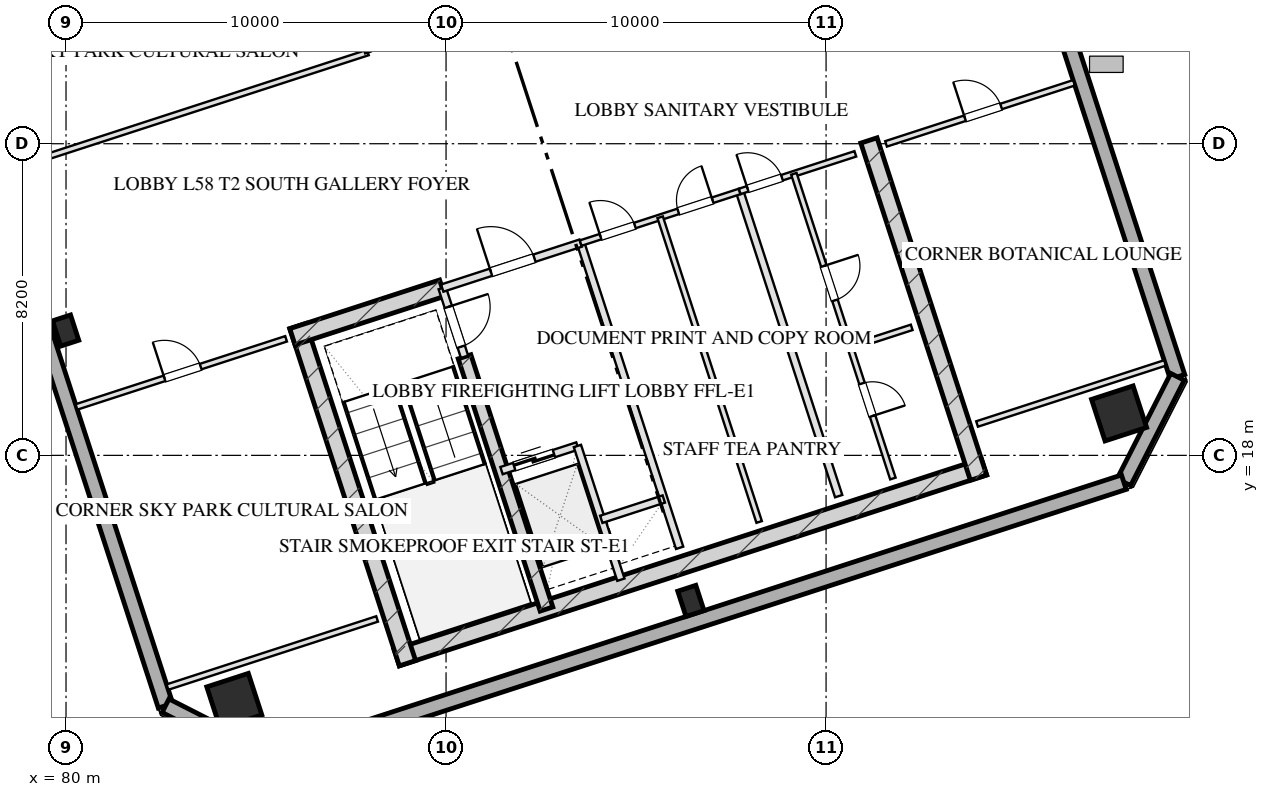
"""IFC4 building model, lengths in metres.
Left out: names, types, materials, properties, quantities, classifications, styles, units other than length and angle.
Written with IfcOpenShell. Run it as: python <this file> out.ifc"""

import sys

from ifc_helpers import new_model, si_unit, direction, frame, frame_2d, origin, origin_2d, place, context, subcontext, project, spatial, rectangle, hollow_rectangle, extrude, element, fill, save


model = new_model("IFC4")
c1 = context("Model", 3, precision=1e-05, world=origin(), true_north=direction((0.0, 1.0)))
c2 = subcontext(c1, "Body", "Model", "MODEL_VIEW")
j1 = project(units=[si_unit("LENGTHUNIT", "METRE"), si_unit("PLANEANGLEUNIT", "RADIAN")], contexts=[c1])
p1 = place(None, origin())
s1 = spatial("IfcSite", under=j1, at=p1, CompositionType="ELEMENT")
p2 = place(p1, origin())
s2 = spatial("IfcBuilding", under=s1, at=p2, CompositionType="ELEMENT")
p3 = place(p2, frame((0.0, 0.0, 216.2)))
s3 = spatial("IfcBuildingStorey", under=s2, at=p3, CompositionType="ELEMENT", Elevation=216.2)
p4 = place(p3, frame((88.701, 12.675, 0.0), z_axis=(0.0, 0.0, 1.0), x_axis=(0.95105824505, 0.309011673763, 0.0)))
e1 = element("IfcWall", 1, at=p4, inside=s3, PredefinedType="SHEAR", context=c2, shape_type="SweptSolid", body=[
    extrude(rectangle(XDim=16.25, YDim=0.45, at=frame_2d((8.125, 0.0))), origin(), (0.0, 0.0, 1.0), 3.45),
])
for number, where, z_axis, x_axis in (
    (2, (86.102, 21.404, 0.0), (0.0, 0.0, 1.0), (0.309, -0.951, 0.0)),
    (3, (101.128, 26.286, 0.0), (0.0, 0.0, 1.0), (0.309, -0.951, 0.0)),
):
    element("IfcWall", number, at=place(p3, frame(where, z_axis=z_axis, x_axis=x_axis)), inside=s3, PredefinedType="SHEAR", context=c2, shape_type="SweptSolid", body=[
        extrude(rectangle(XDim=9.33, YDim=0.45, at=frame_2d((4.665, 0.0))), origin(), (0.0, 0.0, 1.0), 3.45),
    ])
p5 = place(p3, frame((90.486, 20.594, 0.0), z_axis=(0.0, 0.0, 1.0), x_axis=(0.309020428229, -0.951055400562, 0.0)))
e4 = element("IfcWall", 4, at=p5, inside=s3, PredefinedType="SHEAR", context=c2, shape_type="SweptSolid", body=[
    extrude(rectangle(XDim=6.98, YDim=0.35, at=frame_2d((3.49, 0.0))), origin(), (0.0, 0.0, 1.0), 3.45),
])
p6 = place(p3, frame((85.957, 21.12, 0.0), z_axis=(0.0, 0.0, 1.0), x_axis=(0.951064796122, 0.308991510526, 0.0)))
e5 = element("IfcWall", 5, at=p6, inside=s3, PredefinedType="SHEAR", context=c2, shape_type="SweptSolid", body=[
    extrude(rectangle(XDim=4.145, YDim=0.45, at=frame_2d((2.073, 0.0))), origin(), (0.0, 0.0, 1.0), 3.45),
])
for number, where, z_axis, x_axis in (
    (6, (84.428, 11.539, 0.0), (0.0, 0.0, 1.0), (0.951, 0.309, 0.0)),
    (7, (107.71, 19.104, 0.0), (0.0, 0.0, 1.0), (0.951, 0.309, 0.0)),
):
    element("IfcColumn", number, at=place(p3, frame(where, z_axis=z_axis, x_axis=x_axis)), inside=s3, PredefinedType="COLUMN", context=c2, shape_type="SweptSolid", body=[
        extrude(hollow_rectangle(XDim=1.15, YDim=1.15, WallThickness=0.04, at=origin_2d()), origin(), (0.0, 0.0, 1.0), 3.451),
    ])
for number, where, z_axis, x_axis in (
    (8, (79.99, 21.284, 0.0), (0.0, 0.0, 1.0), (0.951, 0.309, 0.0)),
    (9, (96.443, 14.17, 0.0), (0.0, 0.0, 1.0), (0.951, 0.309, 0.0)),
):
    element("IfcColumn", number, at=place(p3, frame(where, z_axis=z_axis, x_axis=x_axis)), inside=s3, PredefinedType="COLUMN", context=c2, shape_type="SweptSolid", body=[
        extrude(hollow_rectangle(XDim=0.5, YDim=0.7, WallThickness=0.025, at=origin_2d()), origin(), (0.0, 0.0, 1.0), 3.451),
    ])
p7 = place(p3, frame((82.618, 11.414, 0.0), z_axis=(0.0, 0.0, 1.0), x_axis=(-0.309016491071, 0.951056679828, 0.0)))
e10 = element("IfcWall", 10, at=p7, inside=s3, PredefinedType="SOLIDWALL", context=c2, shape_type="SweptSolid", body=[
    extrude(rectangle(XDim=38.4, YDim=0.4, at=frame_2d((19.2, 0.0))), origin(), (0.0, 0.0, 1.0), 2.55),
])
p8 = place(p7, frame((24.15, 0.0, 0.0)))
e11 = element("IfcOpeningElement", 11, at=p8, cuts=e10, PredefinedType="OPENING", context=c2, shape_type="SweptSolid", body=[
    extrude(rectangle(XDim=1.8, YDim=2.2, at=frame_2d((0.9, 1.1))), frame((0.0, 0.21, 0.0), z_axis=(0.0, -1.0, 0.0), x_axis=(1.0, 0.0, 0.0)), (0.0, 0.0, 1.0), 0.42),
])
p9 = place(p3, frame((97.382, 56.586, 0.0), z_axis=(0.0, 0.0, 1.0), x_axis=(0.309016491071, -0.951056679828, 0.0)))
e12 = element("IfcWall", 12, at=p9, inside=s3, PredefinedType="SOLIDWALL", context=c2, shape_type="SweptSolid", body=[
    extrude(rectangle(XDim=38.4, YDim=0.4, at=frame_2d((19.2, 0.0))), origin(), (0.0, 0.0, 1.0), 2.55),
])
p10 = place(p9, frame((24.55, 0.0, 0.75)))
e13 = element("IfcOpeningElement", 13, at=p10, cuts=e12, PredefinedType="OPENING", context=c2, shape_type="SweptSolid", body=[
    extrude(rectangle(XDim=2.1, YDim=1.4, at=frame_2d((1.05, 0.7))), frame((0.0, 0.21, 0.0), z_axis=(0.0, -1.0, 0.0), x_axis=(1.0, 0.0, 0.0)), (0.0, 0.0, 1.0), 0.42),
])
p11 = place(p9, frame((20.75, 0.0, 0.75)))
e14 = element("IfcOpeningElement", 14, at=p11, cuts=e12, PredefinedType="OPENING", context=c2, shape_type="SweptSolid", body=[
    extrude(rectangle(XDim=2.1, YDim=1.4, at=frame_2d((1.05, 0.7))), frame((0.0, 0.21, 0.0), z_axis=(0.0, -1.0, 0.0), x_axis=(1.0, 0.0, 0.0)), (0.0, 0.0, 1.0), 0.42),
])
p12 = place(p9, frame((15.55, 0.0, 0.75)))
e15 = element("IfcOpeningElement", 15, at=p12, cuts=e12, PredefinedType="OPENING", context=c2, shape_type="SweptSolid", body=[
    extrude(rectangle(XDim=2.1, YDim=1.4, at=frame_2d((1.05, 0.7))), frame((0.0, 0.21, 0.0), z_axis=(0.0, -1.0, 0.0), x_axis=(1.0, 0.0, 0.0)), (0.0, 0.0, 1.0), 0.42),
])
p13 = place(p9, frame((11.75, 0.0, 0.75)))
e16 = element("IfcOpeningElement", 16, at=p13, cuts=e12, PredefinedType="OPENING", context=c2, shape_type="SweptSolid", body=[
    extrude(rectangle(XDim=2.1, YDim=1.4, at=frame_2d((1.05, 0.7))), frame((0.0, 0.21, 0.0), z_axis=(0.0, -1.0, 0.0), x_axis=(1.0, 0.0, 0.0)), (0.0, 0.0, 1.0), 0.42),
])
p14 = place(p3, frame((109.248, 20.066, 0.0), z_axis=(0.0, 0.0, 1.0), x_axis=(-0.453949291228, -0.891027519774, 0.0)))
e17 = element("IfcWall", 17, at=p14, inside=s3, PredefinedType="SOLIDWALL", context=c2, shape_type="SweptSolid", body=[
    extrude(rectangle(XDim=3.111, YDim=0.4, at=frame_2d((1.556, 0.0))), origin(), (0.0, 0.0, 1.0), 2.55),
])
p15 = place(p3, frame((107.835, 17.294, 0.0), z_axis=(0.0, 0.0, 1.0), x_axis=(-0.951058012937, -0.309012388148, 0.0)))
e18 = element("IfcWall", 18, at=p15, inside=s3, PredefinedType="SOLIDWALL", context=c2, shape_type="SweptSolid", body=[
    extrude(rectangle(XDim=23.6, YDim=0.4, at=frame_2d((11.8, 0.0))), origin(), (0.0, 0.0, 1.0), 2.55),
])
p16 = place(p3, frame((85.39, 10.001, 0.0), z_axis=(0.0, 0.0, 1.0), x_axis=(-0.890979603174, 0.454043331334, 0.0)))
e19 = element("IfcWall", 19, at=p16, inside=s3, PredefinedType="SOLIDWALL", context=c2, shape_type="SweptSolid", body=[
    extrude(rectangle(XDim=3.111, YDim=0.4, at=frame_2d((1.556, 0.0))), origin(), (0.0, 0.0, 1.0), 2.55),
])
p17 = place(p3, frame((89.899, 22.401, 0.0), z_axis=(0.0, 0.0, 1.0), x_axis=(0.308932062672, -0.951084108086, 0.0)))
e20 = element("IfcWall", 20, at=p17, inside=s3, PredefinedType="PARTITIONING", context=c2, shape_type="SweptSolid", body=[
    extrude(rectangle(XDim=1.9, YDim=0.2, at=frame_2d((0.95, 0.0))), origin(), (0.0, 0.0, 1.0), 3.155),
])
p18 = place(p17, frame((0.52, 0.0, 0.0)))
e21 = element("IfcOpeningElement", 21, at=p18, cuts=e20, PredefinedType="OPENING", context=c2, shape_type="SweptSolid", body=[
    extrude(rectangle(XDim=1.1, YDim=2.05, at=frame_2d((0.55, 1.025))), frame((0.0, 0.11, 0.0), z_axis=(0.0, -1.0, 0.0), x_axis=(1.0, 0.0, 0.0)), (0.0, 0.0, 1.0), 0.22),
])
p19 = place(p3, frame((93.542, 23.585, 0.0), z_axis=(0.0, 0.0, 1.0), x_axis=(0.309042196757, -0.951048327176, 0.0)))
e22 = element("IfcWall", 22, at=p19, inside=s3, PredefinedType="PARTITIONING", context=c2, shape_type="SweptSolid", body=[
    extrude(rectangle(XDim=8.43, YDim=0.2, at=frame_2d((4.215, 0.0))), origin(), (0.0, 0.0, 1.0), 3.155),
])
p20 = place(p3, frame((89.899, 22.401, 0.0), z_axis=(0.0, 0.0, 1.0), x_axis=(0.951046716504, 0.309047153403, 0.0)))
e23 = element("IfcWall", 23, at=p20, inside=s3, PredefinedType="PARTITIONING", context=c2, shape_type="SweptSolid", body=[
    extrude(rectangle(XDim=3.83, YDim=0.2, at=frame_2d((1.915, 0.0))), origin(), (0.0, 0.0, 1.0), 3.155),
])
p21 = place(p20, frame((1.35, 0.0, 0.0)))
e24 = element("IfcOpeningElement", 24, at=p21, cuts=e23, PredefinedType="OPENING", context=c2, shape_type="SweptSolid", body=[
    extrude(rectangle(XDim=1.2, YDim=2.05, at=frame_2d((0.6, 1.025))), frame((0.0, 0.11, 0.0), z_axis=(0.0, -1.0, 0.0), x_axis=(1.0, 0.0, 0.0)), (0.0, 0.0, 1.0), 0.22),
])
p22 = place(p3, frame((91.46, 17.598, 0.0), z_axis=(0.0, 0.0, 1.0), x_axis=(0.951062257173, 0.308999325213, 0.0)))
e25 = element("IfcWall", 25, at=p22, inside=s3, PredefinedType="PARTITIONING", context=c2, shape_type="SweptSolid", body=[
    extrude(rectangle(XDim=2.1, YDim=0.2, at=frame_2d((1.05, 0.0))), origin(), (0.0, 0.0, 1.0), 3.155),
])
p23 = place(p22, frame((0.35, 0.0, 0.0)))
e26 = element("IfcOpeningElement", 26, at=p23, cuts=e25, PredefinedType="OPENING", context=c2, shape_type="SweptSolid", body=[
    extrude(rectangle(XDim=1.1, YDim=2.05, at=frame_2d((0.55, 1.025))), frame((0.0, 0.11, 0.0), z_axis=(0.0, -1.0, 0.0), x_axis=(1.0, 0.0, 0.0)), (0.0, 0.0, 1.0), 0.22),
])
p24 = place(p3, frame((93.457, 18.247, 0.0), z_axis=(0.0, 0.0, 1.0), x_axis=(0.3089935693, -0.951064127245, 0.0)))
e27 = element("IfcWall", 27, at=p24, inside=s3, PredefinedType="PARTITIONING", context=c2, shape_type="SweptSolid", body=[
    extrude(rectangle(XDim=3.7, YDim=0.2, at=frame_2d((1.85, 0.0))), origin(), (0.0, 0.0, 1.0), 3.155),
])
p25 = place(p3, frame((94.084, 16.317, 0.0), z_axis=(0.0, 0.0, 1.0), x_axis=(0.951041328149, 0.309063734775, 0.0)))
e28 = element("IfcWall", 28, at=p25, inside=s3, PredefinedType="PARTITIONING", context=c2, shape_type="SweptSolid", body=[
    extrude(rectangle(XDim=1.73, YDim=0.2, at=frame_2d((0.865, 0.0))), origin(), (0.0, 0.0, 1.0), 3.155),
])
p26 = place(p3, frame((97.727, 24.944, 0.0), z_axis=(0.0, 0.0, 1.0), x_axis=(0.309016001439, -0.951056838919, 0.0)))
e29 = element("IfcWall", 29, at=p26, inside=s3, PredefinedType="PARTITIONING", context=c2, shape_type="SweptSolid", body=[
    extrude(rectangle(XDim=8.43, YDim=0.2, at=frame_2d((4.215, 0.0))), origin(), (0.0, 0.0, 1.0), 3.155),
])
p27 = place(p3, frame((93.542, 23.585, 0.0), z_axis=(0.0, 0.0, 1.0), x_axis=(0.951063829732, 0.308994485023, 0.0)))
e30 = element("IfcWall", 30, at=p27, inside=s3, PredefinedType="PARTITIONING", context=c2, shape_type="SweptSolid", body=[
    extrude(rectangle(XDim=4.4, YDim=0.15, at=frame_2d((2.2, 0.0))), origin(), (0.0, 0.0, 1.0), 3.155),
])
p28 = place(p27, frame((0.55, 0.0, 0.0)))
e31 = element("IfcOpeningElement", 31, at=p28, cuts=e30, PredefinedType="OPENING", context=c2, shape_type="SweptSolid", body=[
    extrude(rectangle(XDim=0.95, YDim=2.05, at=frame_2d((0.475, 1.025))), frame((0.0, 0.085, 0.0), z_axis=(0.0, -1.0, 0.0), x_axis=(1.0, 0.0, 0.0)), (0.0, 0.0, 1.0), 0.17),
])
p29 = place(p27, frame((2.7, 0.0, 0.0)))
e32 = element("IfcOpeningElement", 32, at=p29, cuts=e30, PredefinedType="OPENING", context=c2, shape_type="SweptSolid", body=[
    extrude(rectangle(XDim=0.95, YDim=2.05, at=frame_2d((0.475, 1.025))), frame((0.0, 0.085, 0.0), z_axis=(0.0, -1.0, 0.0), x_axis=(1.0, 0.0, 0.0)), (0.0, 0.0, 1.0), 0.17),
])
p30 = place(p3, frame((95.634, 24.265, 0.0), z_axis=(0.0, 0.0, 1.0), x_axis=(0.309007490203, -0.951059604335, 0.0)))
e33 = element("IfcWall", 33, at=p30, inside=s3, PredefinedType="PARTITIONING", context=c2, shape_type="SweptSolid", body=[
    extrude(rectangle(XDim=8.43, YDim=0.15, at=frame_2d((4.215, 0.0))), origin(), (0.0, 0.0, 1.0), 3.155),
])
p31 = place(p3, frame((97.727, 24.944, 0.0), z_axis=(0.0, 0.0, 1.0), x_axis=(0.951036872128, 0.309077446369, 0.0)))
e34 = element("IfcWall", 34, at=p31, inside=s3, PredefinedType="PARTITIONING", context=c2, shape_type="SweptSolid", body=[
    extrude(rectangle(XDim=3.2, YDim=0.15, at=frame_2d((1.6, 0.0))), origin(), (0.0, 0.0, 1.0), 3.155),
])
p32 = place(p31, frame((0.22, 0.0, 0.0)))
e35 = element("IfcOpeningElement", 35, at=p32, cuts=e34, PredefinedType="OPENING", context=c2, shape_type="SweptSolid", body=[
    extrude(rectangle(XDim=0.95, YDim=2.05, at=frame_2d((0.475, 1.025))), frame((0.0, 0.085, 0.0), z_axis=(0.0, -1.0, 0.0), x_axis=(1.0, 0.0, 0.0)), (0.0, 0.0, 1.0), 0.17),
])
p33 = place(p3, frame((99.153, 25.408, 0.0), z_axis=(0.0, 0.0, 1.0), x_axis=(0.309016001439, -0.951056838919, 0.0)))
e36 = element("IfcWall", 36, at=p33, inside=s3, PredefinedType="PARTITIONING", context=c2, shape_type="SweptSolid", body=[
    extrude(rectangle(XDim=8.43, YDim=0.15, at=frame_2d((4.215, 0.0))), origin(), (0.0, 0.0, 1.0), 3.155),
])
p34 = place(p33, frame((2.55, 0.0, 0.0)))
e37 = element("IfcOpeningElement", 37, at=p34, cuts=e36, PredefinedType="OPENING", context=c2, shape_type="SweptSolid", body=[
    extrude(rectangle(XDim=0.95, YDim=2.05, at=frame_2d((0.475, 1.025))), frame((0.0, 0.085, 0.0), z_axis=(0.0, -1.0, 0.0), x_axis=(1.0, 0.0, 0.0)), (0.0, 0.0, 1.0), 0.17),
])
p35 = place(p33, frame((5.8, 0.0, 0.0)))
e38 = element("IfcOpeningElement", 38, at=p35, cuts=e36, PredefinedType="OPENING", context=c2, shape_type="SweptSolid", body=[
    extrude(rectangle(XDim=0.9, YDim=2.05, at=frame_2d((0.45, 1.025))), frame((0.0, 0.085, 0.0), z_axis=(0.0, -1.0, 0.0), x_axis=(1.0, 0.0, 0.0)), (0.0, 0.0, 1.0), 0.17),
])
p36 = place(p3, frame((100.636, 20.843, 0.0), z_axis=(0.0, 0.0, 1.0), x_axis=(0.951040401051, 0.309066587596, 0.0)))
e39 = element("IfcWall", 39, at=p36, inside=s3, PredefinedType="PARTITIONING", context=c2, shape_type="SweptSolid", body=[
    extrude(rectangle(XDim=1.7, YDim=0.15, at=frame_2d((0.85, 0.0))), origin(), (0.0, 0.0, 1.0), 3.155),
])
p37 = place(p3, frame((82.669, 11.903, 0.0), z_axis=(0.0, 0.0, 1.0), x_axis=(0.951059431056, 0.309008023519, 0.0)))
e40 = element("IfcWall", 40, at=p37, inside=s3, PredefinedType="PARTITIONING", context=c2, shape_type="SweptSolid", body=[
    extrude(rectangle(XDim=5.8, YDim=0.15, at=frame_2d((2.9, 0.0))), origin(), (0.0, 0.0, 1.0), 3.155),
])
p38 = place(p3, frame((80.275, 19.274, 0.0), z_axis=(0.0, 0.0, 1.0), x_axis=(0.951059431056, 0.309008023519, 0.0)))
e41 = element("IfcWall", 41, at=p38, inside=s3, PredefinedType="PARTITIONING", context=c2, shape_type="SweptSolid", body=[
    extrude(rectangle(XDim=5.8, YDim=0.15, at=frame_2d((2.9, 0.0))), origin(), (0.0, 0.0, 1.0), 3.155),
])
p39 = place(p38, frame((2.436, 0.0, 0.0)))
e42 = element("IfcOpeningElement", 42, at=p39, cuts=e41, PredefinedType="OPENING", context=c2, shape_type="SweptSolid", body=[
    extrude(rectangle(XDim=1.0, YDim=2.05, at=frame_2d((0.5, 1.025))), frame((0.0, 0.085, 0.0), z_axis=(0.0, -1.0, 0.0), x_axis=(1.0, 0.0, 0.0)), (0.0, 0.0, 1.0), 0.17),
])
p40 = place(p3, frame((103.973, 18.825, 0.0), z_axis=(0.0, 0.0, 1.0), x_axis=(0.951055112834, 0.309021313752, 0.0)))
e43 = element("IfcWall", 43, at=p40, inside=s3, PredefinedType="PARTITIONING", context=c2, shape_type="SweptSolid", body=[
    extrude(rectangle(XDim=5.2, YDim=0.15, at=frame_2d((2.6, 0.0))), origin(), (0.0, 0.0, 1.0), 3.155),
])
p41 = place(p3, frame((101.578, 26.196, 0.0), z_axis=(0.0, 0.0, 1.0), x_axis=(0.951064427824, 0.308992644131, 0.0)))
e44 = element("IfcWall", 44, at=p41, inside=s3, PredefinedType="PARTITIONING", context=c2, shape_type="SweptSolid", body=[
    extrude(rectangle(XDim=5.2, YDim=0.15, at=frame_2d((2.6, 0.0))), origin(), (0.0, 0.0, 1.0), 3.155),
])
p42 = place(p41, frame((2.184, 0.0, 0.0)))
e45 = element("IfcOpeningElement", 45, at=p42, cuts=e44, PredefinedType="OPENING", context=c2, shape_type="SweptSolid", body=[
    extrude(rectangle(XDim=1.0, YDim=2.05, at=frame_2d((0.5, 1.025))), frame((0.0, 0.085, 0.0), z_axis=(0.0, -1.0, 0.0), x_axis=(1.0, 0.0, 0.0)), (0.0, 0.0, 1.0), 0.17),
])
p43 = place(p3, frame((78.266, 25.456, 0.0), z_axis=(0.0, 0.0, 1.0), x_axis=(0.951055402118, 0.30902042344, 0.0)))
e46 = element("IfcWall", 46, at=p43, inside=s3, PredefinedType="PARTITIONING", context=c2, shape_type="SweptSolid", body=[
    extrude(rectangle(XDim=10.175, YDim=0.15, at=frame_2d((5.087, 0.0))), origin(), (0.0, 0.0, 1.0), 3.155),
])
p44 = place(p3, frame((87.943, 28.6, 0.0), z_axis=(0.0, 0.0, 1.0), x_axis=(-0.309024734286, 0.951054001411, 0.0)))
e47 = element("IfcWall", 47, at=p44, inside=s3, PredefinedType="PARTITIONING", context=c2, shape_type="SweptSolid", body=[
    extrude(rectangle(XDim=9.0, YDim=0.15, at=frame_2d((4.5, 0.0))), origin(), (0.0, 0.0, 1.0), 3.155),
])
p45 = place(p44, frame((1.16, 0.0, 0.0)))
e48 = element("IfcOpeningElement", 48, at=p45, cuts=e47, PredefinedType="OPENING", context=c2, shape_type="SweptSolid", body=[
    extrude(rectangle(XDim=1.0, YDim=2.05, at=frame_2d((0.5, 1.025))), frame((0.0, 0.085, 0.0), z_axis=(0.0, -1.0, 0.0), x_axis=(1.0, 0.0, 0.0)), (0.0, 0.0, 1.0), 0.17),
])
p46 = place(p44, frame((5.66, 0.0, 0.0)))
e49 = element("IfcOpeningElement", 49, at=p46, cuts=e47, PredefinedType="OPENING", context=c2, shape_type="SweptSolid", body=[
    extrude(rectangle(XDim=1.0, YDim=2.05, at=frame_2d((0.5, 1.025))), frame((0.0, 0.085, 0.0), z_axis=(0.0, -1.0, 0.0), x_axis=(1.0, 0.0, 0.0)), (0.0, 0.0, 1.0), 0.17),
])
p47 = place(p3, frame((77.24, 28.613, 0.0), z_axis=(0.0, 0.0, 1.0), x_axis=(0.951055402118, 0.30902042344, 0.0)))
e50 = element("IfcWall", 50, at=p47, inside=s3, PredefinedType="MOVABLE", context=c2, shape_type="SweptSolid", body=[
    extrude(rectangle(XDim=10.175, YDim=0.1, at=frame_2d((5.087, 0.0))), origin(), (0.0, 0.0, 1.0), 3.155),
])
p48 = place(p18, origin())
e51 = element("IfcDoor", 51, at=p48, inside=s3, OperationType="SINGLE_SWING_LEFT", PredefinedType="DOOR", context=c2, shape_type="SweptSolid", body=[
    extrude(rectangle(XDim=1.1, YDim=2.05, at=frame_2d((0.55, 1.025))), frame((0.0, 0.025, 0.0), z_axis=(0.0, -1.0, 0.0), x_axis=(1.0, 0.0, 0.0)), (0.0, 0.0, 1.0), 0.05),
])
fill(e21, e51)
p49 = place(p21, origin())
e52 = element("IfcDoor", 52, at=p49, inside=s3, OperationType="SINGLE_SWING_LEFT", PredefinedType="DOOR", context=c2, shape_type="SweptSolid", body=[
    extrude(rectangle(XDim=1.2, YDim=2.05, at=frame_2d((0.6, 1.025))), frame((0.0, 0.025, 0.0), z_axis=(0.0, -1.0, 0.0), x_axis=(1.0, 0.0, 0.0)), (0.0, 0.0, 1.0), 0.05),
])
fill(e24, e52)
p50 = place(p23, origin())
e53 = element("IfcDoor", 53, at=p50, inside=s3, OperationType="DOUBLE_DOOR_SLIDING", PredefinedType="DOOR", context=c2, shape_type="SweptSolid", body=[
    extrude(rectangle(XDim=1.1, YDim=2.05, at=frame_2d((0.55, 1.025))), frame((0.0, 0.025, 0.0), z_axis=(0.0, -1.0, 0.0), x_axis=(1.0, 0.0, 0.0)), (0.0, 0.0, 1.0), 0.05),
])
fill(e26, e53)
p51 = place(p28, origin())
e54 = element("IfcDoor", 54, at=p51, inside=s3, OperationType="SINGLE_SWING_LEFT", PredefinedType="DOOR", context=c2, shape_type="SweptSolid", body=[
    extrude(rectangle(XDim=0.95, YDim=2.05, at=frame_2d((0.475, 1.025))), frame((0.0, 0.025, 0.0), z_axis=(0.0, -1.0, 0.0), x_axis=(1.0, 0.0, 0.0)), (0.0, 0.0, 1.0), 0.05),
])
fill(e31, e54)
p52 = place(p29, origin())
e55 = element("IfcDoor", 55, at=p52, inside=s3, OperationType="SINGLE_SWING_RIGHT", PredefinedType="DOOR", context=c2, shape_type="SweptSolid", body=[
    extrude(rectangle(XDim=0.95, YDim=2.05, at=frame_2d((0.475, 1.025))), frame((0.0, 0.025, 0.0), z_axis=(0.0, -1.0, 0.0), x_axis=(1.0, 0.0, 0.0)), (0.0, 0.0, 1.0), 0.05),
])
fill(e32, e55)
p53 = place(p32, origin())
e56 = element("IfcDoor", 56, at=p53, inside=s3, OperationType="SINGLE_SWING_LEFT", PredefinedType="DOOR", context=c2, shape_type="SweptSolid", body=[
    extrude(rectangle(XDim=0.95, YDim=2.05, at=frame_2d((0.475, 1.025))), frame((0.0, 0.025, 0.0), z_axis=(0.0, -1.0, 0.0), x_axis=(1.0, 0.0, 0.0)), (0.0, 0.0, 1.0), 0.05),
])
fill(e35, e56)
p54 = place(p34, origin())
e57 = element("IfcDoor", 57, at=p54, inside=s3, OperationType="SINGLE_SWING_LEFT", PredefinedType="DOOR", context=c2, shape_type="SweptSolid", body=[
    extrude(rectangle(XDim=0.95, YDim=2.05, at=frame_2d((0.475, 1.025))), frame((0.0, 0.025, 0.0), z_axis=(0.0, -1.0, 0.0), x_axis=(1.0, 0.0, 0.0)), (0.0, 0.0, 1.0), 0.05),
])
fill(e37, e57)
p55 = place(p35, origin())
e58 = element("IfcDoor", 58, at=p55, inside=s3, OperationType="SINGLE_SWING_RIGHT", PredefinedType="DOOR", context=c2, shape_type="SweptSolid", body=[
    extrude(rectangle(XDim=0.9, YDim=2.05, at=frame_2d((0.45, 1.025))), frame((0.0, 0.025, 0.0), z_axis=(0.0, -1.0, 0.0), x_axis=(1.0, 0.0, 0.0)), (0.0, 0.0, 1.0), 0.05),
])
fill(e38, e58)
p56 = place(p39, origin())
e59 = element("IfcDoor", 59, at=p56, inside=s3, OperationType="SINGLE_SWING_LEFT", PredefinedType="DOOR", context=c2, shape_type="SweptSolid", body=[
    extrude(rectangle(XDim=1.0, YDim=2.05, at=frame_2d((0.5, 1.025))), frame((0.0, 0.025, 0.0), z_axis=(0.0, -1.0, 0.0), x_axis=(1.0, 0.0, 0.0)), (0.0, 0.0, 1.0), 0.05),
])
fill(e42, e59)
p57 = place(p42, origin())
e60 = element("IfcDoor", 60, at=p57, inside=s3, OperationType="SINGLE_SWING_LEFT", PredefinedType="DOOR", context=c2, shape_type="SweptSolid", body=[
    extrude(rectangle(XDim=1.0, YDim=2.05, at=frame_2d((0.5, 1.025))), frame((0.0, 0.025, 0.0), z_axis=(0.0, -1.0, 0.0), x_axis=(1.0, 0.0, 0.0)), (0.0, 0.0, 1.0), 0.05),
])
fill(e45, e60)
save(model, sys.argv[1])
